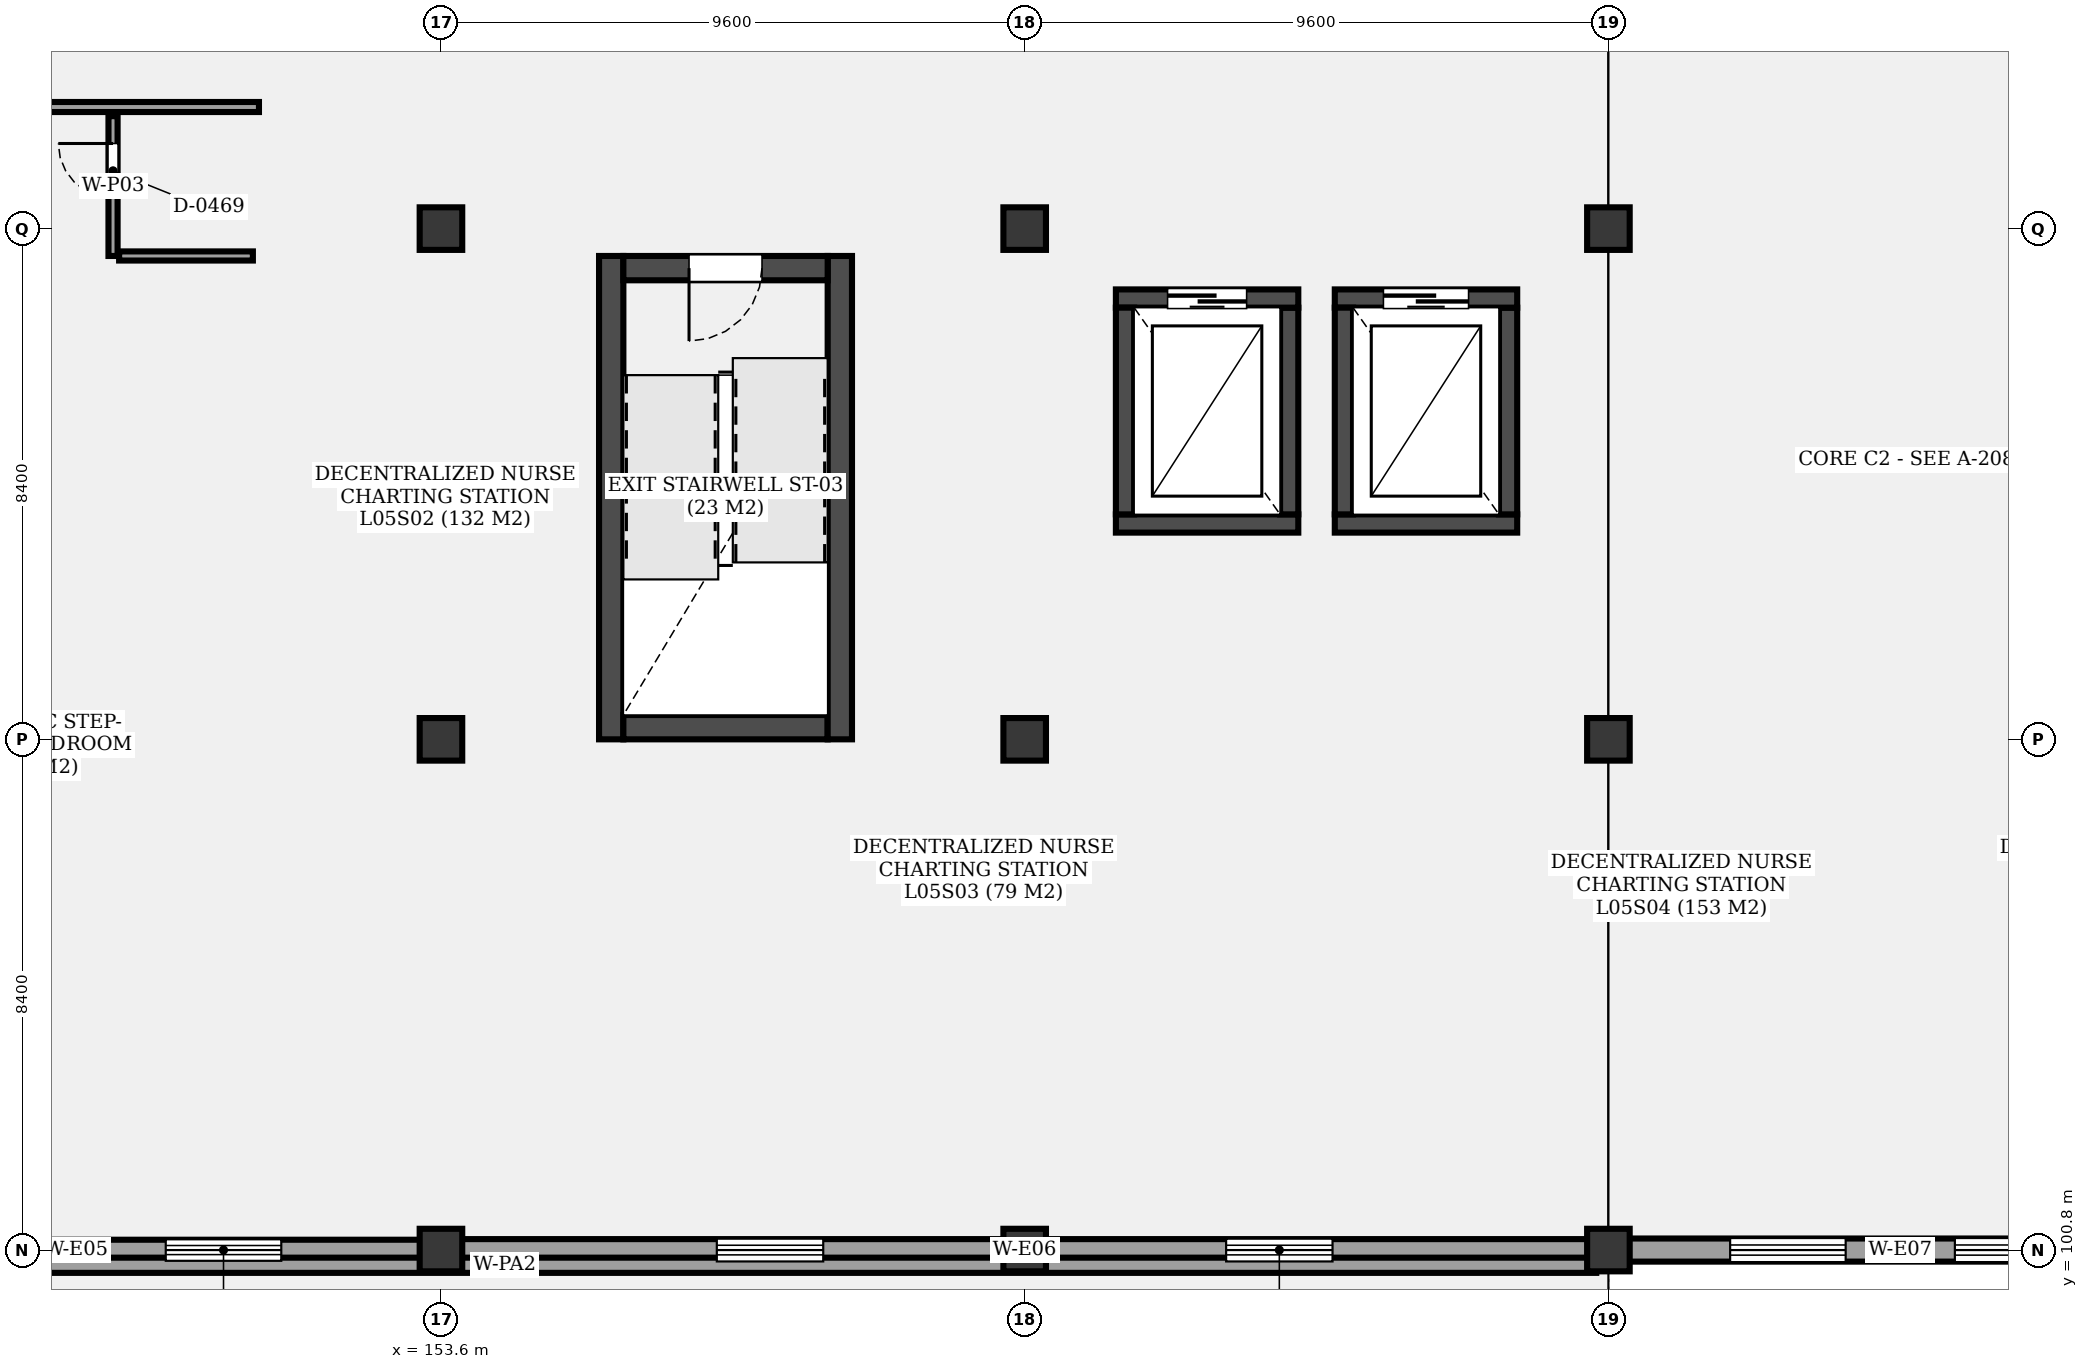
"""IFC4 building model, lengths in metres.
Left out: names, types, materials, properties, quantities, classifications, styles, units other than length and angle.
Written with IfcOpenShell. Run it as: python <this file> out.ifc"""

import sys

from ifc_helpers import new_model, si_unit, direction, frame, frame_2d, origin, origin_2d, place, context, subcontext, project, spatial, rectangle, extrude, element, fill, save


model = new_model("IFC4")
c1 = context("Model", 3, precision=1e-05, world=origin(), true_north=direction((0.0, 1.0)))
c2 = subcontext(c1, "Body", "Model", "MODEL_VIEW")
j1 = project(units=[si_unit("LENGTHUNIT", "METRE"), si_unit("PLANEANGLEUNIT", "RADIAN")], contexts=[c1])
p1 = place(None, origin())
s1 = spatial("IfcSite", under=j1, at=p1, CompositionType="ELEMENT")
p2 = place(p1, origin())
s2 = spatial("IfcBuilding", under=s1, at=p2, CompositionType="ELEMENT")
p3 = place(p2, frame((0.0, 0.0, 22.0)))
s3 = spatial("IfcBuildingStorey", under=s2, at=p3, CompositionType="ELEMENT", Elevation=22.0)
for number, where, z_axis, x_axis in (
    (1, (153.6, 100.8, 0.0), (0.0, 0.0, 1.0), (1.0, 0.0, 0.0)),
    (2, (153.6, 109.2, 0.0), (0.0, 0.0, 1.0), (1.0, 0.0, 0.0)),
    (3, (153.6, 117.6, 0.0), (0.0, 0.0, 1.0), (1.0, 0.0, 0.0)),
    (4, (163.2, 100.8, 0.0), (0.0, 0.0, 1.0), (1.0, 0.0, 0.0)),
    (5, (163.2, 109.2, 0.0), (0.0, 0.0, 1.0), (1.0, 0.0, 0.0)),
    (6, (163.2, 117.6, 0.0), (0.0, 0.0, 1.0), (1.0, 0.0, 0.0)),
    (7, (172.8, 100.8, 0.0), (0.0, 0.0, 1.0), (1.0, 0.0, 0.0)),
    (8, (172.8, 109.2, 0.0), (0.0, 0.0, 1.0), (1.0, 0.0, 0.0)),
    (9, (172.8, 117.6, 0.0), (0.0, 0.0, 1.0), (1.0, 0.0, 0.0)),
):
    element("IfcColumn", number, at=place(p3, frame(where, z_axis=z_axis, x_axis=x_axis)), inside=s3, PredefinedType="COLUMN", context=c2, shape_type="SweptSolid", body=[
        extrude(rectangle(XDim=0.7, YDim=0.7, at=origin_2d()), origin(), (0.0, 0.0, 1.0), 4.2),
    ])
p4 = place(p3, frame((156.4, 117.15, 0.0), z_axis=(0.0, 0.0, 1.0), x_axis=(0.0, -1.0, 0.0)))
e10 = element("IfcWall", 10, at=p4, inside=s3, PredefinedType="SHEAR", context=c2, shape_type="SweptSolid", body=[
    extrude(rectangle(XDim=7.95, YDim=0.4, at=frame_2d((3.975, 0.0))), origin(), (0.0, 0.0, 1.0), 4.2),
])
p5 = place(p3, frame((156.6, 109.4, 0.0), z_axis=(0.0, 0.0, 1.0), x_axis=(1.0, 0.0, 0.0)))
e11 = element("IfcWall", 11, at=p5, inside=s3, PredefinedType="SHEAR", context=c2, shape_type="SweptSolid", body=[
    extrude(rectangle(XDim=3.36, YDim=0.4, at=frame_2d((1.68, 0.0))), origin(), (0.0, 0.0, 1.0), 4.2),
])
p6 = place(p3, frame((160.16, 109.2, 0.0), z_axis=(0.0, 0.0, 1.0), x_axis=(0.0, 1.0, 0.0)))
e12 = element("IfcWall", 12, at=p6, inside=s3, PredefinedType="SHEAR", context=c2, shape_type="SweptSolid", body=[
    extrude(rectangle(XDim=7.95, YDim=0.4, at=frame_2d((3.975, 0.0))), origin(), (0.0, 0.0, 1.0), 4.2),
])
p7 = place(p3, frame((159.96, 116.95, 0.0), z_axis=(0.0, 0.0, 1.0), x_axis=(-1.0, 0.0, 0.0)))
e13 = element("IfcWall", 13, at=p7, inside=s3, PredefinedType="SHEAR", context=c2, shape_type="SweptSolid", body=[
    extrude(rectangle(XDim=3.36, YDim=0.4, at=frame_2d((1.68, 0.0))), origin(), (0.0, 0.0, 1.0), 4.2),
])
p8 = place(p7, frame((1.08, 0.0, 0.0)))
e14 = element("IfcOpeningElement", 14, at=p8, cuts=e13, PredefinedType="OPENING", context=c2, shape_type="SweptSolid", body=[
    extrude(rectangle(XDim=1.2, YDim=2.2, at=frame_2d((0.6, 1.1))), frame((0.0, 0.21, 0.0), z_axis=(0.0, -1.0, 0.0), x_axis=(1.0, 0.0, 0.0)), (0.0, 0.0, 1.0), 0.42),
])
p9 = place(p3, frame((164.7, 112.75, 0.0), z_axis=(0.0, 0.0, 1.0), x_axis=(1.0, 0.0, 0.0)))
e15 = element("IfcWall", 15, at=p9, inside=s3, PredefinedType="SHEAR", context=c2, shape_type="SweptSolid", body=[
    extrude(rectangle(XDim=3.0, YDim=0.3, at=frame_2d((1.5, 0.0))), origin(), (0.0, 0.0, 1.0), 4.2),
])
p10 = place(p3, frame((167.55, 112.9, 0.0), z_axis=(0.0, 0.0, 1.0), x_axis=(0.0, 1.0, 0.0)))
e16 = element("IfcWall", 16, at=p10, inside=s3, PredefinedType="SHEAR", context=c2, shape_type="SweptSolid", body=[
    extrude(rectangle(XDim=3.4, YDim=0.3, at=frame_2d((1.7, 0.0))), origin(), (0.0, 0.0, 1.0), 4.2),
])
p11 = place(p3, frame((167.7, 116.45, 0.0), z_axis=(0.0, 0.0, 1.0), x_axis=(-1.0, 0.0, 0.0)))
e17 = element("IfcWall", 17, at=p11, inside=s3, PredefinedType="SHEAR", context=c2, shape_type="SweptSolid", body=[
    extrude(rectangle(XDim=3.0, YDim=0.3, at=frame_2d((1.5, 0.0))), origin(), (0.0, 0.0, 1.0), 4.2),
])
p12 = place(p11, frame((0.85, 0.0, 0.0)))
e18 = element("IfcOpeningElement", 18, at=p12, cuts=e17, PredefinedType="OPENING", context=c2, shape_type="SweptSolid", body=[
    extrude(rectangle(XDim=1.3, YDim=2.3, at=frame_2d((0.65, 1.15))), frame((0.0, 0.16, 0.0), z_axis=(0.0, -1.0, 0.0), x_axis=(1.0, 0.0, 0.0)), (0.0, 0.0, 1.0), 0.32),
])
p13 = place(p3, frame((164.85, 116.3, 0.0), z_axis=(0.0, 0.0, 1.0), x_axis=(0.0, -1.0, 0.0)))
e19 = element("IfcWall", 19, at=p13, inside=s3, PredefinedType="SHEAR", context=c2, shape_type="SweptSolid", body=[
    extrude(rectangle(XDim=3.4, YDim=0.3, at=frame_2d((1.7, 0.0))), origin(), (0.0, 0.0, 1.0), 4.2),
])
p14 = place(p3, frame((168.3, 112.75, 0.0), z_axis=(0.0, 0.0, 1.0), x_axis=(1.0, 0.0, 0.0)))
e20 = element("IfcWall", 20, at=p14, inside=s3, PredefinedType="SHEAR", context=c2, shape_type="SweptSolid", body=[
    extrude(rectangle(XDim=3.0, YDim=0.3, at=frame_2d((1.5, 0.0))), origin(), (0.0, 0.0, 1.0), 4.2),
])
p15 = place(p3, frame((171.15, 112.9, 0.0), z_axis=(0.0, 0.0, 1.0), x_axis=(0.0, 1.0, 0.0)))
e21 = element("IfcWall", 21, at=p15, inside=s3, PredefinedType="SHEAR", context=c2, shape_type="SweptSolid", body=[
    extrude(rectangle(XDim=3.4, YDim=0.3, at=frame_2d((1.7, 0.0))), origin(), (0.0, 0.0, 1.0), 4.2),
])
p16 = place(p3, frame((171.3, 116.45, 0.0), z_axis=(0.0, 0.0, 1.0), x_axis=(-1.0, 0.0, 0.0)))
e22 = element("IfcWall", 22, at=p16, inside=s3, PredefinedType="SHEAR", context=c2, shape_type="SweptSolid", body=[
    extrude(rectangle(XDim=3.0, YDim=0.3, at=frame_2d((1.5, 0.0))), origin(), (0.0, 0.0, 1.0), 4.2),
])
p17 = place(p16, frame((0.8, 0.0, 0.0)))
e23 = element("IfcOpeningElement", 23, at=p17, cuts=e22, PredefinedType="OPENING", context=c2, shape_type="SweptSolid", body=[
    extrude(rectangle(XDim=1.4, YDim=2.3, at=frame_2d((0.7, 1.15))), frame((0.0, 0.16, 0.0), z_axis=(0.0, -1.0, 0.0), x_axis=(1.0, 0.0, 0.0)), (0.0, 0.0, 1.0), 0.32),
])
p18 = place(p3, frame((168.45, 116.3, 0.0), z_axis=(0.0, 0.0, 1.0), x_axis=(0.0, -1.0, 0.0)))
e24 = element("IfcWall", 24, at=p18, inside=s3, PredefinedType="SHEAR", context=c2, shape_type="SweptSolid", body=[
    extrude(rectangle(XDim=3.4, YDim=0.3, at=frame_2d((1.7, 0.0))), origin(), (0.0, 0.0, 1.0), 4.2),
])
p19 = place(p3, frame((153.6, 100.8, 0.0), z_axis=(0.0, 0.0, 1.0), x_axis=(-1.0, 0.0, 0.0)))
e25 = element("IfcWall", 25, at=p19, inside=s3, PredefinedType="SOLIDWALL", context=c2, shape_type="SweptSolid", body=[
    extrude(rectangle(XDim=12.0, YDim=0.34, at=frame_2d((6.0, 0.0))), origin(), (0.0, 0.0, 1.0), 3.39),
])
p20 = place(p19, frame((2.626, 0.0, 0.85)))
e26 = element("IfcOpeningElement", 26, at=p20, cuts=e25, PredefinedType="OPENING", context=c2, shape_type="SweptSolid", body=[
    extrude(rectangle(XDim=1.9, YDim=1.4, at=frame_2d((0.95, 0.7))), frame((0.0, 0.18, 0.0), z_axis=(0.0, -1.0, 0.0), x_axis=(1.0, 0.0, 0.0)), (0.0, 0.0, 1.0), 0.36),
])
p21 = place(p19, frame((7.474, 0.0, 0.85)))
e27 = element("IfcOpeningElement", 27, at=p21, cuts=e25, PredefinedType="OPENING", context=c2, shape_type="SweptSolid", body=[
    extrude(rectangle(XDim=1.9, YDim=1.4, at=frame_2d((0.95, 0.7))), frame((0.0, 0.18, 0.0), z_axis=(0.0, -1.0, 0.0), x_axis=(1.0, 0.0, 0.0)), (0.0, 0.0, 1.0), 0.36),
])
p22 = place(p3, frame((172.8, 100.8, 0.0), z_axis=(0.0, 0.0, 1.0), x_axis=(-1.0, 0.0, 0.0)))
e28 = element("IfcWall", 28, at=p22, inside=s3, PredefinedType="SOLIDWALL", context=c2, shape_type="SweptSolid", body=[
    extrude(rectangle(XDim=19.2, YDim=0.36, at=frame_2d((9.6, 0.0))), origin(), (0.0, 0.0, 1.0), 3.39),
])
p23 = place(p22, frame((4.537, 0.0, 0.85)))
e29 = element("IfcOpeningElement", 29, at=p23, cuts=e28, PredefinedType="OPENING", context=c2, shape_type="SweptSolid", body=[
    extrude(rectangle(XDim=1.75, YDim=1.4, at=frame_2d((0.875, 0.7))), frame((0.0, 0.19, 0.0), z_axis=(0.0, -1.0, 0.0), x_axis=(1.0, 0.0, 0.0)), (0.0, 0.0, 1.0), 0.38),
])
p24 = place(p22, frame((12.913, 0.0, 0.85)))
e30 = element("IfcOpeningElement", 30, at=p24, cuts=e28, PredefinedType="OPENING", context=c2, shape_type="SweptSolid", body=[
    extrude(rectangle(XDim=1.75, YDim=1.4, at=frame_2d((0.875, 0.7))), frame((0.0, 0.19, 0.0), z_axis=(0.0, -1.0, 0.0), x_axis=(1.0, 0.0, 0.0)), (0.0, 0.0, 1.0), 0.38),
])
p25 = place(p3, frame((182.4, 100.8, 0.0), z_axis=(0.0, 0.0, 1.0), x_axis=(-1.0, 0.0, 0.0)))
e31 = element("IfcWall", 31, at=p25, inside=s3, PredefinedType="SOLIDWALL", context=c2, shape_type="SweptSolid", body=[
    extrude(rectangle(XDim=9.6, YDim=0.38, at=frame_2d((4.8, 0.0))), origin(), (0.0, 0.0, 1.0), 3.39),
])
p26 = place(p25, frame((2.002, 0.0, 0.85)))
e32 = element("IfcOpeningElement", 32, at=p26, cuts=e31, PredefinedType="OPENING", context=c2, shape_type="SweptSolid", body=[
    extrude(rectangle(XDim=1.9, YDim=1.4, at=frame_2d((0.95, 0.7))), frame((0.0, 0.2, 0.0), z_axis=(0.0, -1.0, 0.0), x_axis=(1.0, 0.0, 0.0)), (0.0, 0.0, 1.0), 0.4),
])
p27 = place(p25, frame((5.698, 0.0, 0.85)))
e33 = element("IfcOpeningElement", 33, at=p27, cuts=e31, PredefinedType="OPENING", context=c2, shape_type="SweptSolid", body=[
    extrude(rectangle(XDim=1.9, YDim=1.4, at=frame_2d((0.95, 0.7))), frame((0.0, 0.2, 0.0), z_axis=(0.0, -1.0, 0.0), x_axis=(1.0, 0.0, 0.0)), (0.0, 0.0, 1.0), 0.4),
])
p28 = place(p3, frame((134.6, 100.55, 0.0), z_axis=(0.0, 0.0, 1.0), x_axis=(1.0, 0.0, 0.0)))
e34 = element("IfcWall", 34, at=p28, inside=s3, PredefinedType="PARAPET", context=c2, shape_type="SweptSolid", body=[
    extrude(rectangle(XDim=38.0, YDim=0.25, at=frame_2d((19.0, 0.0))), origin(), (0.0, 0.0, 1.0), 1.15),
])
p29 = place(p3, frame((141.85, 119.6, 0.0), z_axis=(0.0, 0.0, 1.0), x_axis=(1.0, 0.0, 0.0)))
e35 = element("IfcWall", 35, at=p29, inside=s3, PredefinedType="PARTITIONING", context=c2, shape_type="SweptSolid", body=[
    extrude(rectangle(XDim=8.757, YDim=0.165, at=frame_2d((4.378, 0.0))), origin(), (0.0, 0.0, 1.0), 3.3),
])
p30 = place(p29, frame((2.65, 0.0, 0.0)))
e36 = element("IfcOpeningElement", 36, at=p30, cuts=e35, PredefinedType="OPENING", context=c2, shape_type="SweptSolid", body=[
    extrude(rectangle(XDim=1.3, YDim=2.2, at=frame_2d((0.65, 1.1))), frame((0.0, 0.093, 0.0), z_axis=(0.0, -1.0, 0.0), x_axis=(1.0, 0.0, 0.0)), (0.0, 0.0, 1.0), 0.185),
])
p31 = place(p3, frame((148.207, 117.15, 0.0), z_axis=(0.0, 0.0, 1.0), x_axis=(0.0, 1.0, 0.0)))
e37 = element("IfcWall", 37, at=p31, inside=s3, PredefinedType="PARTITIONING", context=c2, shape_type="SweptSolid", body=[
    extrude(rectangle(XDim=2.3, YDim=0.15, at=frame_2d((1.15, 0.0))), origin(), (0.0, 0.0, 1.0), 3.3),
])
p32 = place(p31, frame((0.95, 0.0, 0.0)))
e38 = element("IfcOpeningElement", 38, at=p32, cuts=e37, PredefinedType="OPENING", context=c2, shape_type="SweptSolid", body=[
    extrude(rectangle(XDim=0.9, YDim=2.1, at=frame_2d((0.45, 1.05))), frame((0.0, 0.085, 0.0), z_axis=(0.0, -1.0, 0.0), x_axis=(1.0, 0.0, 0.0)), (0.0, 0.0, 1.0), 0.17),
])
p33 = place(p3, frame((148.307, 117.15, 0.0), z_axis=(0.0, 0.0, 1.0), x_axis=(1.0, 0.0, 0.0)))
e39 = element("IfcWall", 39, at=p33, inside=s3, PredefinedType="PARTITIONING", context=c2, shape_type="SweptSolid", body=[
    extrude(rectangle(XDim=2.2, YDim=0.15, at=frame_2d((1.1, 0.0))), origin(), (0.0, 0.0, 1.0), 3.3),
])
p34 = place(p8, origin())
e40 = element("IfcDoor", 40, at=p34, inside=s3, OperationType="SINGLE_SWING_RIGHT", PredefinedType="DOOR", context=c2, shape_type="SweptSolid", body=[
    extrude(rectangle(XDim=1.2, YDim=2.2, at=frame_2d((0.6, 1.1))), frame((0.0, 0.025, 0.0), z_axis=(0.0, -1.0, 0.0), x_axis=(1.0, 0.0, 0.0)), (0.0, 0.0, 1.0), 0.05),
])
fill(e14, e40)
p35 = place(p12, origin())
e41 = element("IfcDoor", 41, at=p35, inside=s3, OperationType="SLIDING_TO_RIGHT", PredefinedType="DOOR", context=c2, shape_type="SweptSolid", body=[
    extrude(rectangle(XDim=1.3, YDim=2.3, at=frame_2d((0.65, 1.15))), frame((0.0, 0.025, 0.0), z_axis=(0.0, -1.0, 0.0), x_axis=(1.0, 0.0, 0.0)), (0.0, 0.0, 1.0), 0.05),
])
fill(e18, e41)
p36 = place(p17, origin())
e42 = element("IfcDoor", 42, at=p36, inside=s3, OperationType="SLIDING_TO_LEFT", PredefinedType="DOOR", context=c2, shape_type="SweptSolid", body=[
    extrude(rectangle(XDim=1.4, YDim=2.3, at=frame_2d((0.7, 1.15))), frame((0.0, 0.025, 0.0), z_axis=(0.0, -1.0, 0.0), x_axis=(1.0, 0.0, 0.0)), (0.0, 0.0, 1.0), 0.05),
])
fill(e23, e42)
p37 = place(p20, origin())
e43 = element("IfcWindow", 43, at=p37, inside=s3, PartitioningType="SINGLE_PANEL", PredefinedType="WINDOW", context=c2, shape_type="SweptSolid", body=[
    extrude(rectangle(XDim=1.9, YDim=1.4, at=frame_2d((0.95, 0.7))), frame((0.0, 0.03, 0.0), z_axis=(0.0, -1.0, 0.0), x_axis=(1.0, 0.0, 0.0)), (0.0, 0.0, 1.0), 0.06),
])
fill(e26, e43)
p38 = place(p23, origin())
e44 = element("IfcWindow", 44, at=p38, inside=s3, PartitioningType="SINGLE_PANEL", PredefinedType="WINDOW", context=c2, shape_type="SweptSolid", body=[
    extrude(rectangle(XDim=1.75, YDim=1.4, at=frame_2d((0.875, 0.7))), frame((0.0, 0.03, 0.0), z_axis=(0.0, -1.0, 0.0), x_axis=(1.0, 0.0, 0.0)), (0.0, 0.0, 1.0), 0.06),
])
fill(e29, e44)
p39 = place(p24, origin())
e45 = element("IfcWindow", 45, at=p39, inside=s3, PartitioningType="SINGLE_PANEL", PredefinedType="WINDOW", context=c2, shape_type="SweptSolid", body=[
    extrude(rectangle(XDim=1.75, YDim=1.4, at=frame_2d((0.875, 0.7))), frame((0.0, 0.03, 0.0), z_axis=(0.0, -1.0, 0.0), x_axis=(1.0, 0.0, 0.0)), (0.0, 0.0, 1.0), 0.06),
])
fill(e30, e45)
p40 = place(p26, origin())
e46 = element("IfcWindow", 46, at=p40, inside=s3, PartitioningType="SINGLE_PANEL", PredefinedType="WINDOW", context=c2, shape_type="SweptSolid", body=[
    extrude(rectangle(XDim=1.9, YDim=1.4, at=frame_2d((0.95, 0.7))), frame((0.0, 0.03, 0.0), z_axis=(0.0, -1.0, 0.0), x_axis=(1.0, 0.0, 0.0)), (0.0, 0.0, 1.0), 0.06),
])
fill(e32, e46)
p41 = place(p27, origin())
e47 = element("IfcWindow", 47, at=p41, inside=s3, PartitioningType="SINGLE_PANEL", PredefinedType="WINDOW", context=c2, shape_type="SweptSolid", body=[
    extrude(rectangle(XDim=1.9, YDim=1.4, at=frame_2d((0.95, 0.7))), frame((0.0, 0.03, 0.0), z_axis=(0.0, -1.0, 0.0), x_axis=(1.0, 0.0, 0.0)), (0.0, 0.0, 1.0), 0.06),
])
fill(e33, e47)
p42 = place(p32, origin())
e48 = element("IfcDoor", 48, at=p42, inside=s3, OperationType="SINGLE_SWING_RIGHT", PredefinedType="DOOR", context=c2, shape_type="SweptSolid", body=[
    extrude(rectangle(XDim=0.9, YDim=2.1, at=frame_2d((0.45, 1.05))), frame((0.0, 0.025, 0.0), z_axis=(0.0, -1.0, 0.0), x_axis=(1.0, 0.0, 0.0)), (0.0, 0.0, 1.0), 0.05),
])
fill(e38, e48)
save(model, sys.argv[1])
